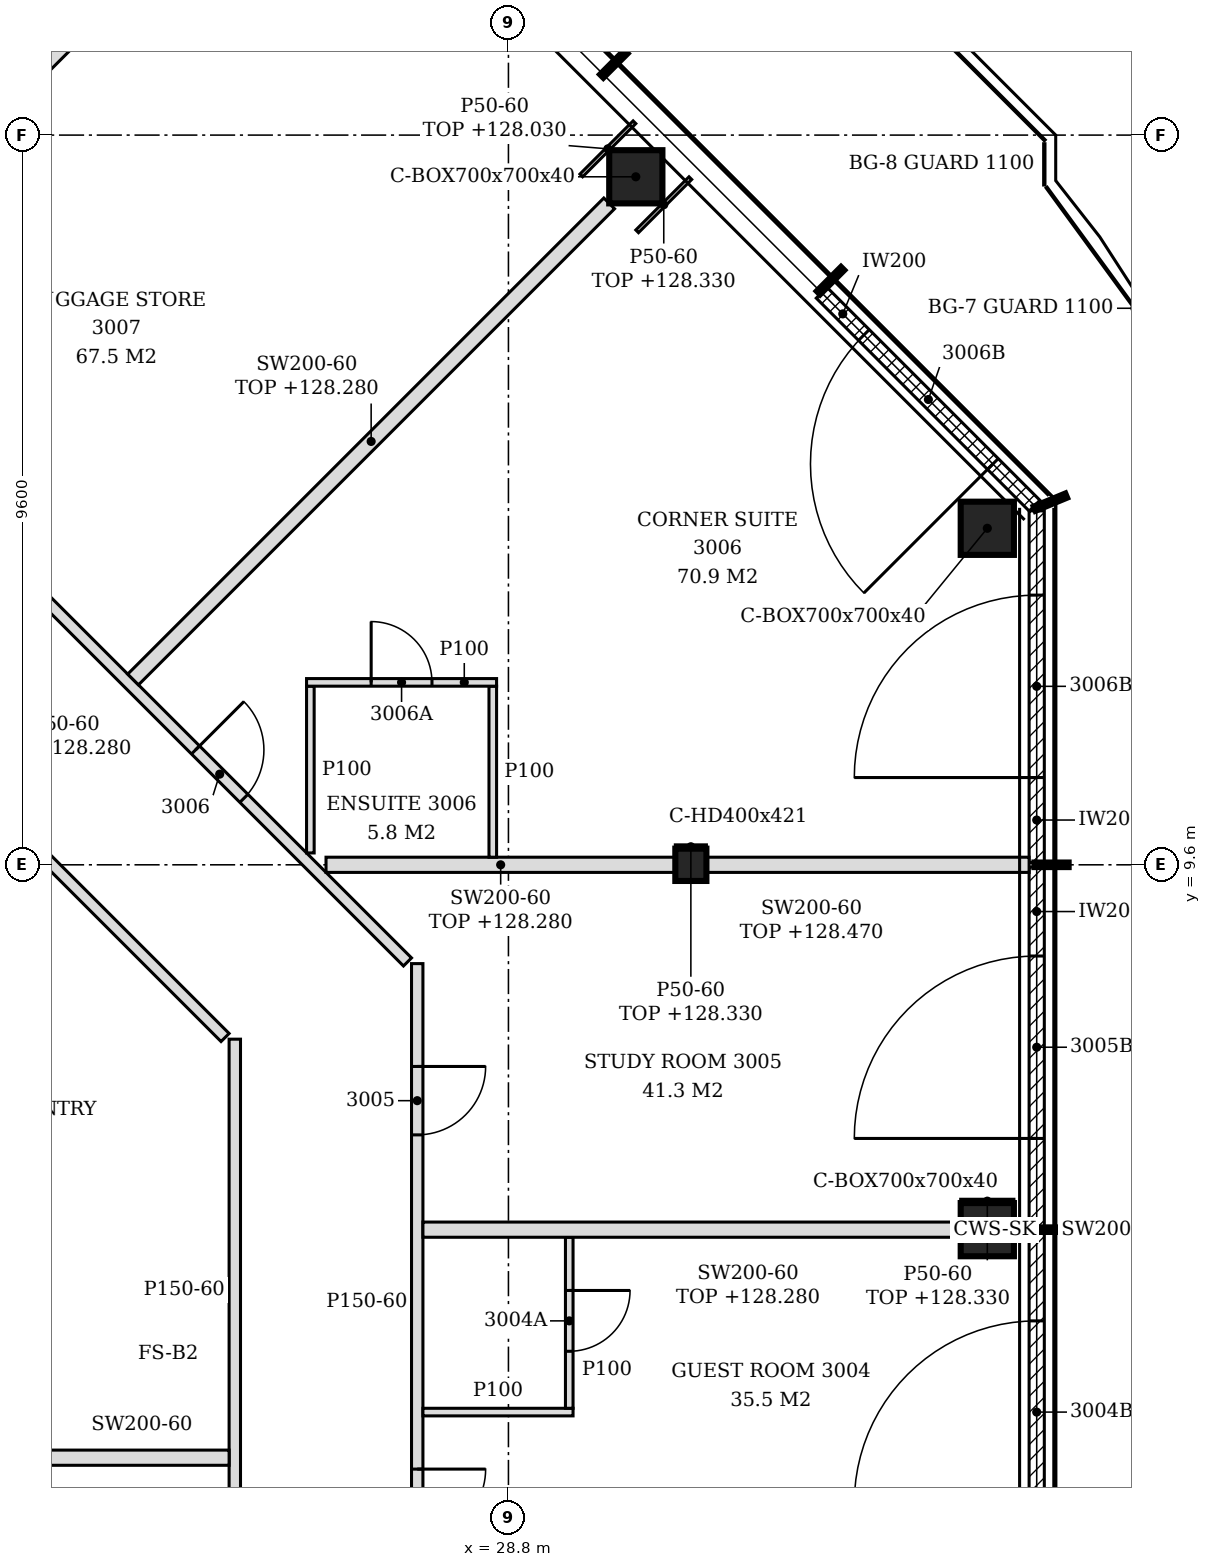
"""IFC4 building model, lengths in metres.
Left out: names, types, materials, properties, quantities, classifications, styles, units other than length and angle.
Written with IfcOpenShell. Run it as: python <this file> out.ifc"""

import sys

from ifc_helpers import new_model, si_unit, direction, frame, frame_2d, origin, origin_2d, place, context, subcontext, project, spatial, polyline, rectangle, hollow_rectangle, i_section, outline, extrude, element, fill, save


model = new_model("IFC4")
c1 = context("Model", 3, precision=1e-05, world=origin(), true_north=direction((0.0, 1.0)))
c2 = subcontext(c1, "Body", "Model", "MODEL_VIEW")
j1 = project(units=[si_unit("LENGTHUNIT", "METRE"), si_unit("PLANEANGLEUNIT", "RADIAN")], contexts=[c1])
p1 = place(None, origin())
s1 = spatial("IfcSite", under=j1, at=p1, CompositionType="ELEMENT")
p2 = place(p1, origin())
s2 = spatial("IfcBuilding", under=s1, at=p2, CompositionType="ELEMENT")
p3 = place(p2, frame((0.0, 0.0, 125.4)))
s3 = spatial("IfcBuildingStorey", under=s2, at=p3, CompositionType="ELEMENT", Elevation=125.4)
for number, where, z_axis, x_axis in (
    (1, (35.1, 4.8, -0.15), (0.0, 0.0, 1.0), (1.0, 0.0, 0.0)),
    (2, (35.1, 14.027, -0.15), (0.0, 0.0, 1.0), (1.0, 0.0, 0.0)),
    (3, (30.476, 18.652, -0.15), (0.0, 0.0, 1.0), (1.0, 0.0, 0.0)),
):
    element("IfcColumn", number, at=place(p3, frame(where, z_axis=z_axis, x_axis=x_axis)), inside=s3, PredefinedType="COLUMN", context=c2, shape_type="SweptSolid", body=[
        extrude(hollow_rectangle(XDim=0.7, YDim=0.7, WallThickness=0.04, at=origin_2d()), origin(), (0.0, 0.0, 1.0), 3.6),
    ])
p4 = place(p3, frame((31.2, 9.6, -0.15), z_axis=(0.0, 0.0, 1.0), x_axis=(1.0, 0.0, 0.0)))
e4 = element("IfcColumn", 4, at=p4, inside=s3, PredefinedType="COLUMN", context=c2, shape_type="SweptSolid", body=[
    extrude(i_section(OverallWidth=0.409, OverallDepth=0.425, WebThickness=0.033, FlangeThickness=0.052, FilletRadius=0.015, at=origin_2d()), origin(), (0.0, 0.0, 1.0), 3.6),
])
p5 = place(p3, frame((35.75, 0.03, 0.0), z_axis=(0.0, 0.0, 1.0), x_axis=(0.0, 1.0, 0.0)))
e5 = element("IfcWall", 5, at=p5, inside=s3, PredefinedType="NOTDEFINED", context=c2, shape_type="SweptSolid", body=[
    extrude(rectangle(XDim=4.74, YDim=0.2, at=frame_2d((2.37, 0.0))), origin(), (0.0, 0.0, 1.0), 3.45),
])
p6 = place(p5, frame((1.17, 0.0, 0.0)))
e6 = element("IfcOpeningElement", 6, at=p6, cuts=e5, PredefinedType="OPENING", context=c2, shape_type="SweptSolid", body=[
    extrude(rectangle(XDim=2.4, YDim=2.4, at=frame_2d((1.2, 1.2))), frame((0.0, 0.11, 0.0), z_axis=(0.0, -1.0, 0.0), x_axis=(1.0, 0.0, 0.0)), (0.0, 0.0, 1.0), 0.22),
])
p7 = place(p3, frame((35.75, 4.83, 0.0), z_axis=(0.0, 0.0, 1.0), x_axis=(0.0, 1.0, 0.0)))
e7 = element("IfcWall", 7, at=p7, inside=s3, PredefinedType="NOTDEFINED", context=c2, shape_type="SweptSolid", body=[
    extrude(rectangle(XDim=4.74, YDim=0.2, at=frame_2d((2.37, 0.0))), origin(), (0.0, 0.0, 1.0), 3.45),
])
p8 = place(p7, frame((1.17, 0.0, 0.0)))
e8 = element("IfcOpeningElement", 8, at=p8, cuts=e7, PredefinedType="OPENING", context=c2, shape_type="SweptSolid", body=[
    extrude(rectangle(XDim=2.4, YDim=2.4, at=frame_2d((1.2, 1.2))), frame((0.0, 0.11, 0.0), z_axis=(0.0, -1.0, 0.0), x_axis=(1.0, 0.0, 0.0)), (0.0, 0.0, 1.0), 0.22),
])
p9 = place(p3, frame((35.75, 9.63, 0.0), z_axis=(0.0, 0.0, 1.0), x_axis=(0.0, 1.0, 0.0)))
e9 = element("IfcWall", 9, at=p9, inside=s3, PredefinedType="NOTDEFINED", context=c2, shape_type="SweptSolid", body=[
    extrude(rectangle(XDim=4.626, YDim=0.2, at=frame_2d((2.313, 0.0))), origin(), (0.0, 0.0, 1.0), 3.45),
])
p10 = place(p9, frame((1.118, 0.0, 0.0)))
e10 = element("IfcOpeningElement", 10, at=p10, cuts=e9, PredefinedType="OPENING", context=c2, shape_type="SweptSolid", body=[
    extrude(rectangle(XDim=2.4, YDim=2.4, at=frame_2d((1.2, 1.2))), frame((0.0, 0.11, 0.0), z_axis=(0.0, -1.0, 0.0), x_axis=(1.0, 0.0, 0.0)), (0.0, 0.0, 1.0), 0.22),
])
p11 = place(p3, frame((35.722, 14.325, 0.0), z_axis=(0.0, 0.0, 1.0), x_axis=(-0.707106781187, 0.707106781187, 0.0)))
e11 = element("IfcWall", 11, at=p11, inside=s3, PredefinedType="NOTDEFINED", context=c2, shape_type="SweptSolid", body=[
    extrude(rectangle(XDim=3.962, YDim=0.2, at=frame_2d((1.981, 0.0))), origin(), (0.0, 0.0, 1.0), 3.45),
])
p12 = place(p11, frame((0.775, 0.0, 0.0)))
e12 = element("IfcOpeningElement", 12, at=p12, cuts=e11, PredefinedType="OPENING", context=c2, shape_type="SweptSolid", body=[
    extrude(rectangle(XDim=2.4, YDim=2.4, at=frame_2d((1.2, 1.2))), frame((0.0, 0.11, 0.0), z_axis=(0.0, -1.0, 0.0), x_axis=(1.0, 0.0, 0.0)), (0.0, 0.0, 1.0), 0.22),
])
p13 = place(p3, frame((27.6, -3.248, 0.0), z_axis=(0.0, 0.0, 1.0), x_axis=(0.0, 1.0, 0.0)))
e13 = element("IfcWall", 13, at=p13, inside=s3, PredefinedType="PARTITIONING", context=c2, shape_type="SweptSolid", body=[
    extrude(outline(polyline([(0.0, 0.0), (11.548, 0.0), (11.548, 3.45), (8.153, 3.45), (8.151, 2.88), (7.943, 2.88), (7.941, 3.45), (3.353, 3.45), (3.351, 2.88), (3.143, 2.88), (3.141, 3.45), (0.0, 3.45), (0.0, 0.0)])), frame((0.0, 0.075, 0.0), z_axis=(0.0, -1.0, 0.0), x_axis=(1.0, 0.0, 0.0)), (0.0, 0.0, 1.0), 0.15),
])
p14 = place(p13, frame((1.101, 0.0, 0.0)))
e14 = element("IfcOpeningElement", 14, at=p14, cuts=e13, PredefinedType="OPENING", context=c2, shape_type="SweptSolid", body=[
    extrude(rectangle(XDim=0.9, YDim=2.1, at=frame_2d((0.45, 1.05))), frame((0.0, 0.085, 0.0), z_axis=(0.0, -1.0, 0.0), x_axis=(1.0, 0.0, 0.0)), (0.0, 0.0, 1.0), 0.17),
])
p15 = place(p13, frame((3.998, 0.0, 0.0)))
e15 = element("IfcOpeningElement", 15, at=p15, cuts=e13, PredefinedType="OPENING", context=c2, shape_type="SweptSolid", body=[
    extrude(rectangle(XDim=0.9, YDim=2.1, at=frame_2d((0.45, 1.05))), frame((0.0, 0.085, 0.0), z_axis=(0.0, -1.0, 0.0), x_axis=(1.0, 0.0, 0.0)), (0.0, 0.0, 1.0), 0.17),
])
p16 = place(p13, frame((9.295, 0.0, 0.0)))
e16 = element("IfcOpeningElement", 16, at=p16, cuts=e13, PredefinedType="OPENING", context=c2, shape_type="SweptSolid", body=[
    extrude(rectangle(XDim=0.9, YDim=2.1, at=frame_2d((0.45, 1.05))), frame((0.0, 0.085, 0.0), z_axis=(0.0, -1.0, 0.0), x_axis=(1.0, 0.0, 0.0)), (0.0, 0.0, 1.0), 0.17),
])
p17 = place(p3, frame((25.2, -1.125, 0.0), z_axis=(0.0, 0.0, 1.0), x_axis=(0.0, 1.0, 0.0)))
e17 = element("IfcWall", 17, at=p17, inside=s3, PredefinedType="PARTITIONING", context=c2, shape_type="SweptSolid", body=[
    extrude(outline(polyline([(0.0, 0.0), (8.431, 0.0), (8.431, 3.45), (6.03, 3.45), (6.028, 2.88), (5.82, 2.88), (5.818, 3.45), (1.23, 3.45), (1.228, 2.88), (1.02, 2.88), (1.018, 3.45), (0.0, 3.45), (0.0, 0.0)])), frame((0.0, 0.075, 0.0), z_axis=(0.0, -1.0, 0.0), x_axis=(1.0, 0.0, 0.0)), (0.0, 0.0, 1.0), 0.15),
])
p18 = place(p17, frame((1.025, 0.0, 0.0)))
e18 = element("IfcOpeningElement", 18, at=p18, cuts=e17, PredefinedType="OPENING", context=c2, shape_type="SweptSolid", body=[
    extrude(rectangle(XDim=0.8, YDim=2.1, at=frame_2d((0.4, 1.05))), frame((0.0, 0.085, 0.0), z_axis=(0.0, -1.0, 0.0), x_axis=(1.0, 0.0, 0.0)), (0.0, 0.0, 1.0), 0.17),
])
p19 = place(p3, frame((22.6, 1.8, 0.0), z_axis=(0.0, 0.0, 1.0), x_axis=(1.0, 0.0, 0.0)))
e19 = element("IfcWall", 19, at=p19, inside=s3, PredefinedType="PARTITIONING", context=c2, shape_type="SweptSolid", body=[
    extrude(rectangle(XDim=2.525, YDim=0.2, at=frame_2d((1.262, 0.0))), origin(), (0.0, 0.0, 1.0), 3.45),
])
p20 = place(p3, frame((27.675, 2.4, 0.0), z_axis=(0.0, 0.0, 1.0), x_axis=(1.0, 0.0, 0.0)))
e20 = element("IfcWall", 20, at=p20, inside=s3, PredefinedType="PARTITIONING", context=c2, shape_type="SweptSolid", body=[
    extrude(rectangle(XDim=1.975, YDim=0.1, at=frame_2d((0.987, 0.0))), origin(), (0.0, 0.0, 1.0), 3.45),
])
p21 = place(p3, frame((29.6, 2.45, 0.0), z_axis=(0.0, 0.0, 1.0), x_axis=(0.0, 1.0, 0.0)))
e21 = element("IfcWall", 21, at=p21, inside=s3, PredefinedType="PARTITIONING", context=c2, shape_type="SweptSolid", body=[
    extrude(outline(polyline([(0.0, 0.0), (2.25, 0.0), (2.25, 2.88), (2.245, 2.88), (2.243, 3.45), (0.0, 3.45), (0.0, 0.0)])), frame((0.0, 0.05, 0.0), z_axis=(0.0, -1.0, 0.0), x_axis=(1.0, 0.0, 0.0)), (0.0, 0.0, 1.0), 0.1),
])
p22 = place(p21, frame((0.75, 0.0, 0.0)))
e22 = element("IfcOpeningElement", 22, at=p22, cuts=e21, PredefinedType="OPENING", context=c2, shape_type="SweptSolid", body=[
    extrude(rectangle(XDim=0.8, YDim=2.1, at=frame_2d((0.4, 1.05))), frame((0.0, 0.06, 0.0), z_axis=(0.0, -1.0, 0.0), x_axis=(1.0, 0.0, 0.0)), (0.0, 0.0, 1.0), 0.12),
])
p23 = place(p3, frame((27.675, 4.8, 0.0), z_axis=(0.0, 0.0, 1.0), x_axis=(1.0, 0.0, 0.0)))
e23 = element("IfcWall", 23, at=p23, inside=s3, PredefinedType="PARTITIONING", context=c2, shape_type="SweptSolid", body=[
    extrude(rectangle(XDim=7.075, YDim=0.2, at=frame_2d((3.538, 0.0))), origin(), (0.0, 0.0, 1.0), 2.88),
])
p24 = place(p3, frame((35.45, 4.8, 0.0), z_axis=(0.0, 0.0, 1.0), x_axis=(1.0, 0.0, 0.0)))
e24 = element("IfcWall", 24, at=p24, inside=s3, PredefinedType="PARTITIONING", context=c2, shape_type="SweptSolid", body=[
    extrude(rectangle(XDim=0.2, YDim=0.2, at=frame_2d((0.1, 0.0))), origin(), (0.0, 0.0, 1.0), 3.45),
])
p25 = place(p3, frame((25.072, 7.328, 0.0), z_axis=(0.0, 0.0, 1.0), x_axis=(-0.707106781187, 0.707106781187, 0.0)))
e25 = element("IfcWall", 25, at=p25, inside=s3, PredefinedType="PARTITIONING", context=c2, shape_type="SweptSolid", body=[
    extrude(rectangle(XDim=8.01, YDim=0.15, at=frame_2d((4.005, 0.0))), origin(), (0.0, 0.0, 1.0), 2.88),
])
p26 = place(p3, frame((27.472, 8.322, 0.0), z_axis=(0.0, 0.0, 1.0), x_axis=(-0.707106781187, 0.707106781187, 0.0)))
e26 = element("IfcWall", 26, at=p26, inside=s3, PredefinedType="PARTITIONING", context=c2, shape_type="SweptSolid", body=[
    extrude(rectangle(XDim=16.9, YDim=0.15, at=frame_2d((8.45, 0.0))), origin(), (0.0, 0.0, 1.0), 2.73),
])
p27 = place(p26, frame((3.044, 0.0, 0.0)))
e27 = element("IfcOpeningElement", 27, at=p27, cuts=e26, PredefinedType="OPENING", context=c2, shape_type="SweptSolid", body=[
    extrude(rectangle(XDim=0.9, YDim=2.1, at=frame_2d((0.45, 1.05))), frame((0.0, 0.085, 0.0), z_axis=(0.0, -1.0, 0.0), x_axis=(1.0, 0.0, 0.0)), (0.0, 0.0, 1.0), 0.17),
])
p28 = place(p26, frame((8.0, 0.0, 0.0)))
e28 = element("IfcOpeningElement", 28, at=p28, cuts=e26, PredefinedType="OPENING", context=c2, shape_type="SweptSolid", body=[
    extrude(rectangle(XDim=0.9, YDim=2.1, at=frame_2d((0.45, 1.05))), frame((0.0, 0.085, 0.0), z_axis=(0.0, -1.0, 0.0), x_axis=(1.0, 0.0, 0.0)), (0.0, 0.0, 1.0), 0.17),
])
p29 = place(p3, frame((26.4, 9.6, 0.0), z_axis=(0.0, 0.0, 1.0), x_axis=(1.0, 0.0, 0.0)))
e29 = element("IfcWall", 29, at=p29, inside=s3, PredefinedType="PARTITIONING", context=c2, shape_type="SweptSolid", body=[
    extrude(rectangle(XDim=4.595, YDim=0.2, at=frame_2d((2.298, 0.0))), origin(), (0.0, 0.0, 1.0), 2.88),
])
p30 = place(p3, frame((31.405, 9.6, 0.0), z_axis=(0.0, 0.0, 1.0), x_axis=(1.0, 0.0, 0.0)))
e30 = element("IfcWall", 30, at=p30, inside=s3, PredefinedType="PARTITIONING", context=c2, shape_type="SweptSolid", body=[
    extrude(outline(polyline([(0.0, 0.0), (4.245, 0.0), (4.246, 3.07), (3.845, 3.07), (3.844, 2.93), (3.545, 2.93), (3.543, 3.07), (0.0, 3.07), (0.0, 0.0)])), frame((0.0, 0.1, 0.0), z_axis=(0.0, -1.0, 0.0), x_axis=(1.0, 0.0, 0.0)), (0.0, 0.0, 1.0), 0.2),
])
p31 = place(p3, frame((28.594, 9.7, 0.0), z_axis=(0.0, 0.0, 1.0), x_axis=(0.0, 1.0, 0.0)))
e31 = element("IfcWall", 31, at=p31, inside=s3, PredefinedType="PARTITIONING", context=c2, shape_type="SweptSolid", body=[
    extrude(outline(polyline([(0.0, 0.0), (2.25, 0.0), (2.25, 3.45), (0.005, 3.45), (0.003, 2.88), (0.0, 2.88), (0.0, 0.0)])), frame((0.0, 0.05, 0.0), z_axis=(0.0, -1.0, 0.0), x_axis=(1.0, 0.0, 0.0)), (0.0, 0.0, 1.0), 0.1),
])
p32 = place(p3, frame((26.194, 9.756, 0.0), z_axis=(0.0, 0.0, 1.0), x_axis=(0.0, 1.0, 0.0)))
e32 = element("IfcWall", 32, at=p32, inside=s3, PredefinedType="PARTITIONING", context=c2, shape_type="SweptSolid", body=[
    extrude(rectangle(XDim=2.194, YDim=0.1, at=frame_2d((1.097, 0.0))), origin(), (0.0, 0.0, 1.0), 3.45),
])
p33 = place(p3, frame((23.862, 12.038, 0.0), z_axis=(0.0, 0.0, 1.0), x_axis=(0.707106781187, 0.707106781187, 0.0)))
e33 = element("IfcWall", 33, at=p33, inside=s3, PredefinedType="PARTITIONING", context=c2, shape_type="SweptSolid", body=[
    extrude(rectangle(XDim=8.858, YDim=0.2, at=frame_2d((4.429, 0.0))), origin(), (0.0, 0.0, 1.0), 2.88),
])
p34 = place(p3, frame((26.144, 12.0, 0.0), z_axis=(0.0, 0.0, 1.0), x_axis=(1.0, 0.0, 0.0)))
e34 = element("IfcWall", 34, at=p34, inside=s3, PredefinedType="PARTITIONING", context=c2, shape_type="SweptSolid", body=[
    extrude(rectangle(XDim=2.5, YDim=0.1, at=frame_2d((1.25, 0.0))), origin(), (0.0, 0.0, 1.0), 3.45),
])
p35 = place(p34, frame((0.85, 0.0, 0.0)))
e35 = element("IfcOpeningElement", 35, at=p35, cuts=e34, PredefinedType="OPENING", context=c2, shape_type="SweptSolid", body=[
    extrude(rectangle(XDim=0.8, YDim=2.1, at=frame_2d((0.4, 1.05))), frame((0.0, 0.06, 0.0), z_axis=(0.0, -1.0, 0.0), x_axis=(1.0, 0.0, 0.0)), (0.0, 0.0, 1.0), 0.12),
])
p36 = place(p3, frame((19.238, 16.662, 0.0), z_axis=(0.0, 0.0, 1.0), x_axis=(0.707120561855, 0.707093000249, 0.0)))
e36 = element("IfcWall", 36, at=p36, inside=s3, PredefinedType="PARTITIONING", context=c2, shape_type="SweptSolid", body=[
    extrude(rectangle(XDim=8.858, YDim=0.2, at=frame_2d((4.429, 0.0))), origin(), (0.0, 0.0, 1.0), 2.73),
])
p37 = place(p3, frame((34.75, 5.175, 0.0), z_axis=(0.0, 0.0, 1.0), x_axis=(1.0, 0.0, 0.0)))
e37 = element("IfcWall", 37, at=p37, inside=s3, PredefinedType="PARTITIONING", context=c2, shape_type="SweptSolid", body=[
    extrude(rectangle(XDim=0.7, YDim=0.05, at=frame_2d((0.35, 0.0))), origin(), (0.0, 0.0, 1.0), 2.93),
])
p38 = place(p3, frame((30.996, 9.837, 0.0), z_axis=(0.0, 0.0, 1.0), x_axis=(1.0, 0.0, 0.0)))
e38 = element("IfcWall", 38, at=p38, inside=s3, PredefinedType="PARTITIONING", context=c2, shape_type="SweptSolid", body=[
    extrude(rectangle(XDim=0.409, YDim=0.05, at=frame_2d((0.205, 0.0))), origin(), (0.0, 0.0, 1.0), 2.93),
])
p39 = place(p3, frame((29.758, 18.669, 0.0), z_axis=(0.0, 0.0, 1.0), x_axis=(0.707106781187, 0.707106781187, 0.0)))
e39 = element("IfcWall", 39, at=p39, inside=s3, PredefinedType="PARTITIONING", context=c2, shape_type="SweptSolid", body=[
    extrude(rectangle(XDim=0.99, YDim=0.05, at=frame_2d((0.495, 0.0))), origin(), (0.0, 0.0, 1.0), 2.63),
])
p40 = place(p3, frame((30.493, 17.934, 0.0), z_axis=(0.0, 0.0, 1.0), x_axis=(0.707106781187, 0.707106781187, 0.0)))
e40 = element("IfcWall", 40, at=p40, inside=s3, PredefinedType="PARTITIONING", context=c2, shape_type="SweptSolid", body=[
    extrude(rectangle(XDim=0.99, YDim=0.05, at=frame_2d((0.495, 0.0))), origin(), (0.0, 0.0, 1.0), 2.93),
])
p41 = place(p6, origin())
e41 = element("IfcDoor", 41, at=p41, inside=s3, OperationType="SINGLE_SWING_LEFT", PredefinedType="DOOR", context=c2, shape_type="SweptSolid", body=[
    extrude(rectangle(XDim=2.4, YDim=2.4, at=frame_2d((1.2, 1.2))), frame((0.0, 0.025, 0.0), z_axis=(0.0, -1.0, 0.0), x_axis=(1.0, 0.0, 0.0)), (0.0, 0.0, 1.0), 0.05),
])
fill(e6, e41)
p42 = place(p8, origin())
e42 = element("IfcDoor", 42, at=p42, inside=s3, OperationType="SINGLE_SWING_LEFT", PredefinedType="DOOR", context=c2, shape_type="SweptSolid", body=[
    extrude(rectangle(XDim=2.4, YDim=2.4, at=frame_2d((1.2, 1.2))), frame((0.0, 0.025, 0.0), z_axis=(0.0, -1.0, 0.0), x_axis=(1.0, 0.0, 0.0)), (0.0, 0.0, 1.0), 0.05),
])
fill(e8, e42)
p43 = place(p10, origin())
e43 = element("IfcDoor", 43, at=p43, inside=s3, OperationType="SINGLE_SWING_LEFT", PredefinedType="DOOR", context=c2, shape_type="SweptSolid", body=[
    extrude(rectangle(XDim=2.4, YDim=2.4, at=frame_2d((1.2, 1.2))), frame((0.0, 0.025, 0.0), z_axis=(0.0, -1.0, 0.0), x_axis=(1.0, 0.0, 0.0)), (0.0, 0.0, 1.0), 0.05),
])
fill(e10, e43)
p44 = place(p12, origin())
e44 = element("IfcDoor", 44, at=p44, inside=s3, OperationType="SINGLE_SWING_LEFT", PredefinedType="DOOR", context=c2, shape_type="SweptSolid", body=[
    extrude(rectangle(XDim=2.4, YDim=2.4, at=frame_2d((1.2, 1.2))), frame((0.0, 0.025, 0.0), z_axis=(0.0, -1.0, 0.0), x_axis=(1.0, 0.0, 0.0)), (0.0, 0.0, 1.0), 0.05),
])
fill(e12, e44)
p45 = place(p15, frame((0.9, 0.0, 0.0), z_axis=(0.0, 0.0, 1.0), x_axis=(-1.0, 0.0, 0.0)))
e45 = element("IfcDoor", 45, at=p45, inside=s3, OperationType="SINGLE_SWING_LEFT", PredefinedType="DOOR", context=c2, shape_type="SweptSolid", body=[
    extrude(rectangle(XDim=0.9, YDim=2.1, at=frame_2d((0.45, 1.05))), frame((0.0, 0.025, 0.0), z_axis=(0.0, -1.0, 0.0), x_axis=(1.0, 0.0, 0.0)), (0.0, 0.0, 1.0), 0.05),
])
fill(e15, e45)
p46 = place(p22, frame((0.8, 0.0, 0.0), z_axis=(0.0, 0.0, 1.0), x_axis=(-1.0, 0.0, 0.0)))
e46 = element("IfcDoor", 46, at=p46, inside=s3, OperationType="SINGLE_SWING_LEFT", PredefinedType="DOOR", context=c2, shape_type="SweptSolid", body=[
    extrude(rectangle(XDim=0.8, YDim=2.1, at=frame_2d((0.4, 1.05))), frame((0.0, 0.025, 0.0), z_axis=(0.0, -1.0, 0.0), x_axis=(1.0, 0.0, 0.0)), (0.0, 0.0, 1.0), 0.05),
])
fill(e22, e46)
p47 = place(p16, frame((0.9, 0.0, 0.0), z_axis=(0.0, 0.0, 1.0), x_axis=(-1.0, 0.0, 0.0)))
e47 = element("IfcDoor", 47, at=p47, inside=s3, OperationType="SINGLE_SWING_LEFT", PredefinedType="DOOR", context=c2, shape_type="SweptSolid", body=[
    extrude(rectangle(XDim=0.9, YDim=2.1, at=frame_2d((0.45, 1.05))), frame((0.0, 0.025, 0.0), z_axis=(0.0, -1.0, 0.0), x_axis=(1.0, 0.0, 0.0)), (0.0, 0.0, 1.0), 0.05),
])
fill(e16, e47)
p48 = place(p27, frame((0.9, 0.0, 0.0), z_axis=(0.0, 0.0, 1.0), x_axis=(-1.0, 0.0, 0.0)))
e48 = element("IfcDoor", 48, at=p48, inside=s3, OperationType="SINGLE_SWING_LEFT", PredefinedType="DOOR", context=c2, shape_type="SweptSolid", body=[
    extrude(rectangle(XDim=0.9, YDim=2.1, at=frame_2d((0.45, 1.05))), frame((0.0, 0.025, 0.0), z_axis=(0.0, -1.0, 0.0), x_axis=(1.0, 0.0, 0.0)), (0.0, 0.0, 1.0), 0.05),
])
fill(e27, e48)
p49 = place(p35, origin())
e49 = element("IfcDoor", 49, at=p49, inside=s3, OperationType="SINGLE_SWING_LEFT", PredefinedType="DOOR", context=c2, shape_type="SweptSolid", body=[
    extrude(rectangle(XDim=0.8, YDim=2.1, at=frame_2d((0.4, 1.05))), frame((0.0, 0.025, 0.0), z_axis=(0.0, -1.0, 0.0), x_axis=(1.0, 0.0, 0.0)), (0.0, 0.0, 1.0), 0.05),
])
fill(e35, e49)
save(model, sys.argv[1])
